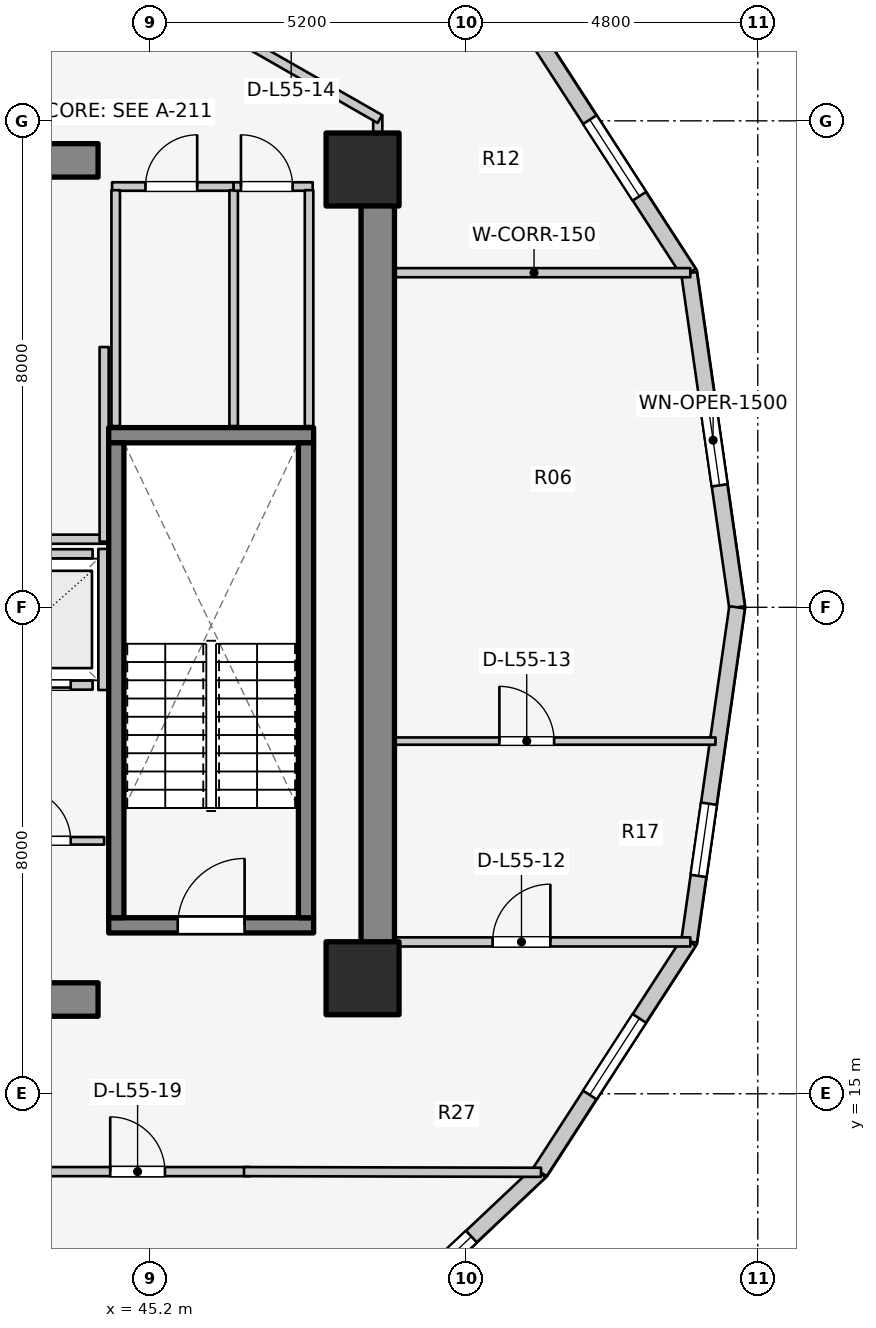
"""IFC4 building model, lengths in metres.
Left out: names, types, materials, properties, quantities, classifications, styles, units other than length and angle.
Written with IfcOpenShell. Run it as: python <this file> out.ifc"""

import sys

from ifc_helpers import new_model, si_unit, direction, frame, frame_2d, origin, origin_2d, place, context, subcontext, project, spatial, rectangle, extrude, element, fill, save


model = new_model("IFC4")
c1 = context("Model", 3, precision=1e-05, world=origin(), true_north=direction((0.0, 1.0)))
c2 = subcontext(c1, "Body", "Model", "MODEL_VIEW")
j1 = project(units=[si_unit("LENGTHUNIT", "METRE"), si_unit("PLANEANGLEUNIT", "RADIAN")], contexts=[c1])
p1 = place(None, origin())
s1 = spatial("IfcSite", under=j1, at=p1, CompositionType="ELEMENT")
p2 = place(p1, origin())
s2 = spatial("IfcBuilding", under=s1, at=p2, CompositionType="ELEMENT")
p3 = place(p2, frame((0.0, 0.0, 180.8)))
s3 = spatial("IfcBuildingStorey", under=s2, at=p3, CompositionType="ELEMENT", Elevation=180.8)
p4 = place(p3, frame((48.95, 17.05, 0.0), z_axis=(0.0, 0.0, 1.0), x_axis=(0.0, 1.0, 0.0)))
e1 = element("IfcWall", 1, at=p4, inside=s3, PredefinedType="SHEAR", context=c2, shape_type="SweptSolid", body=[
    extrude(rectangle(XDim=12.8, YDim=0.55, at=frame_2d((6.4, 0.0))), origin(), (0.0, 0.0, 1.0), 3.1),
])
for number, where, z_axis, x_axis in (
    (2, (39.85, 16.55, 0.0), (0.0, 0.0, 1.0), (1.0, 0.0, 0.0)),
    (3, (39.85, 30.35, 0.0), (0.0, 0.0, 1.0), (1.0, 0.0, 0.0)),
):
    element("IfcWall", number, at=place(p3, frame(where, z_axis=z_axis, x_axis=x_axis)), inside=s3, PredefinedType="SHEAR", context=c2, shape_type="SweptSolid", body=[
        extrude(rectangle(XDim=4.5, YDim=0.55, at=frame_2d((2.25, 0.0))), origin(), (0.0, 0.0, 1.0), 3.1),
    ])
p5 = place(p3, frame((44.525, 17.77, 0.0), z_axis=(0.0, 0.0, 1.0), x_axis=(1.0, 0.0, 0.0)))
e4 = element("IfcWall", 4, at=p5, inside=s3, PredefinedType="SOLIDWALL", context=c2, shape_type="SweptSolid", body=[
    extrude(rectangle(XDim=3.37, YDim=0.25, at=frame_2d((1.685, 0.0))), origin(), (0.0, 0.0, 1.0), 3.1),
])
p6 = place(p5, frame((1.135, 0.0, 0.0)))
e5 = element("IfcOpeningElement", 5, at=p6, cuts=e4, PredefinedType="OPENING", context=c2, shape_type="SweptSolid", body=[
    extrude(rectangle(XDim=1.1, YDim=2.1, at=frame_2d((0.55, 1.05))), frame((0.0, 0.135, 0.0), z_axis=(0.0, -1.0, 0.0), x_axis=(1.0, 0.0, 0.0)), (0.0, 0.0, 1.0), 0.27),
])
p7 = place(p3, frame((44.525, 25.83, 0.0), z_axis=(0.0, 0.0, 1.0), x_axis=(1.0, 0.0, 0.0)))
e6 = element("IfcWall", 6, at=p7, inside=s3, PredefinedType="SOLIDWALL", context=c2, shape_type="SweptSolid", body=[
    extrude(rectangle(XDim=3.37, YDim=0.25, at=frame_2d((1.685, 0.0))), origin(), (0.0, 0.0, 1.0), 3.1),
])
for number, where, z_axis, x_axis in (
    (7, (44.65, 17.895, 0.0), (0.0, 0.0, 1.0), (0.0, 1.0, 0.0)),
    (8, (47.77, 17.895, 0.0), (0.0, 0.0, 1.0), (0.0, 1.0, 0.0)),
):
    element("IfcWall", number, at=place(p3, frame(where, z_axis=z_axis, x_axis=x_axis)), inside=s3, PredefinedType="SOLIDWALL", context=c2, shape_type="SweptSolid", body=[
        extrude(rectangle(XDim=7.81, YDim=0.25, at=frame_2d((3.905, 0.0))), origin(), (0.0, 0.0, 1.0), 3.1),
    ])
for number, where, z_axis, x_axis in (
    (9, (48.7, 16.9, 0.0), (0.0, 0.0, 1.0), (1.0, 0.0, 0.0)),
    (10, (48.7, 30.2, 0.0), (0.0, 0.0, 1.0), (1.0, 0.0, 0.0)),
):
    element("IfcColumn", number, at=place(p3, frame(where, z_axis=z_axis, x_axis=x_axis)), inside=s3, PredefinedType="COLUMN", context=c2, shape_type="SweptSolid", body=[
        extrude(rectangle(XDim=1.2, YDim=1.2, at=origin_2d()), origin(), (0.0, 0.0, 1.0), 3.1),
    ])
p8 = place(p3, frame((54.86, 23.0, 0.0), z_axis=(0.0, 0.0, 1.0), x_axis=(-0.142227632286, 0.989833976288, 0.0)))
e11 = element("IfcWall", 11, at=p8, inside=s3, PredefinedType="STANDARD", context=c2, shape_type="SweptSolid", body=[
    extrude(rectangle(XDim=5.553, YDim=0.26, at=frame_2d((2.776, 0.0))), origin(), (0.0, 0.0, 1.0), 2.85),
])
p9 = place(p8, frame((2.027, 0.0, 0.75)))
e12 = element("IfcOpeningElement", 12, at=p9, cuts=e11, PredefinedType="OPENING", context=c2, shape_type="SweptSolid", body=[
    extrude(rectangle(XDim=1.5, YDim=1.6, at=frame_2d((0.75, 0.8))), frame((0.0, 0.14, 0.0), z_axis=(0.0, -1.0, 0.0), x_axis=(1.0, 0.0, 0.0)), (0.0, 0.0, 1.0), 0.28),
])
p10 = place(p3, frame((54.07, 28.497, 0.0), z_axis=(0.0, 0.0, 1.0), x_axis=(-0.543358984534, 0.839500454989, 0.0)))
e13 = element("IfcWall", 13, at=p10, inside=s3, PredefinedType="STANDARD", context=c2, shape_type="SweptSolid", body=[
    extrude(rectangle(XDim=4.511, YDim=0.26, at=frame_2d((2.256, 0.0))), origin(), (0.0, 0.0, 1.0), 2.85),
])
p11 = place(p10, frame((1.506, 0.0, 0.75)))
e14 = element("IfcOpeningElement", 14, at=p11, cuts=e13, PredefinedType="OPENING", context=c2, shape_type="SweptSolid", body=[
    extrude(rectangle(XDim=1.5, YDim=1.6, at=frame_2d((0.75, 0.8))), frame((0.0, 0.14, 0.0), z_axis=(0.0, -1.0, 0.0), x_axis=(1.0, 0.0, 0.0)), (0.0, 0.0, 1.0), 0.28),
])
p12 = place(p3, frame((48.269, 10.559, 0.0), z_axis=(0.0, 0.0, 1.0), x_axis=(0.727667301037, 0.68593024354, 0.0)))
e15 = element("IfcWall", 15, at=p12, inside=s3, PredefinedType="STANDARD", context=c2, shape_type="SweptSolid", body=[
    extrude(rectangle(XDim=4.604, YDim=0.26, at=frame_2d((2.302, 0.0))), origin(), (0.0, 0.0, 1.0), 2.85),
])
p13 = place(p12, frame((1.552, 0.0, 0.75)))
e16 = element("IfcOpeningElement", 16, at=p13, cuts=e15, PredefinedType="OPENING", context=c2, shape_type="SweptSolid", body=[
    extrude(rectangle(XDim=1.5, YDim=1.6, at=frame_2d((0.75, 0.8))), frame((0.0, 0.14, 0.0), z_axis=(0.0, -1.0, 0.0), x_axis=(1.0, 0.0, 0.0)), (0.0, 0.0, 1.0), 0.28),
])
p14 = place(p3, frame((51.619, 13.716, 0.0), z_axis=(0.0, 0.0, 1.0), x_axis=(0.543358984534, 0.839500454989, 0.0)))
e17 = element("IfcWall", 17, at=p14, inside=s3, PredefinedType="STANDARD", context=c2, shape_type="SweptSolid", body=[
    extrude(rectangle(XDim=4.511, YDim=0.26, at=frame_2d((2.256, 0.0))), origin(), (0.0, 0.0, 1.0), 2.85),
])
p15 = place(p14, frame((1.506, 0.0, 0.75)))
e18 = element("IfcOpeningElement", 18, at=p15, cuts=e17, PredefinedType="OPENING", context=c2, shape_type="SweptSolid", body=[
    extrude(rectangle(XDim=1.5, YDim=1.6, at=frame_2d((0.75, 0.8))), frame((0.0, 0.14, 0.0), z_axis=(0.0, -1.0, 0.0), x_axis=(1.0, 0.0, 0.0)), (0.0, 0.0, 1.0), 0.28),
])
p16 = place(p3, frame((54.07, 17.503, 0.0), z_axis=(0.0, 0.0, 1.0), x_axis=(0.142227632286, 0.989833976288, 0.0)))
e19 = element("IfcWall", 19, at=p16, inside=s3, PredefinedType="STANDARD", context=c2, shape_type="SweptSolid", body=[
    extrude(rectangle(XDim=5.553, YDim=0.26, at=frame_2d((2.776, 0.0))), origin(), (0.0, 0.0, 1.0), 2.85),
])
p17 = place(p16, frame((1.09, 0.0, 0.75)))
e20 = element("IfcOpeningElement", 20, at=p17, cuts=e19, PredefinedType="OPENING", context=c2, shape_type="SweptSolid", body=[
    extrude(rectangle(XDim=1.2, YDim=1.5, at=frame_2d((0.6, 0.75))), frame((0.0, 0.14, 0.0), z_axis=(0.0, -1.0, 0.0), x_axis=(1.0, 0.0, 0.0)), (0.0, 0.0, 1.0), 0.28),
])
p18 = place(p3, frame((42.44, 21.72, 0.0), z_axis=(0.0, 0.0, 1.0), x_axis=(1.0, 0.0, 0.0)))
e21 = element("IfcWall", 21, at=p18, inside=s3, PredefinedType="SOLIDWALL", context=c2, shape_type="SweptSolid", body=[
    extrude(rectangle(XDim=1.82, YDim=0.15, at=frame_2d((0.91, 0.0))), origin(), (0.0, 0.0, 1.0), 2.855),
])
p19 = place(p18, frame((0.36, 0.0, 0.0)))
e22 = element("IfcOpeningElement", 22, at=p19, cuts=e21, PredefinedType="OPENING", context=c2, shape_type="SweptSolid", body=[
    extrude(rectangle(XDim=1.1, YDim=2.1, at=frame_2d((0.55, 1.05))), frame((0.0, 0.085, 0.0), z_axis=(0.0, -1.0, 0.0), x_axis=(1.0, 0.0, 0.0)), (0.0, 0.0, 1.0), 0.17),
])
p20 = place(p3, frame((42.44, 23.88, 0.0), z_axis=(0.0, 0.0, 1.0), x_axis=(1.0, 0.0, 0.0)))
e23 = element("IfcWall", 23, at=p20, inside=s3, PredefinedType="SOLIDWALL", context=c2, shape_type="SweptSolid", body=[
    extrude(rectangle(XDim=1.82, YDim=0.15, at=frame_2d((0.91, 0.0))), origin(), (0.0, 0.0, 1.0), 2.855),
])
p21 = place(p3, frame((44.43, 21.64, 0.0), z_axis=(0.0, 0.0, 1.0), x_axis=(0.0, 1.0, 0.0)))
e24 = element("IfcWall", 24, at=p21, inside=s3, PredefinedType="SOLIDWALL", context=c2, shape_type="SweptSolid", body=[
    extrude(rectangle(XDim=2.32, YDim=0.15, at=frame_2d((1.16, 0.0))), origin(), (0.0, 0.0, 1.0), 2.855),
])
p22 = place(p3, frame((39.4, 24.12, 0.0), z_axis=(0.0, 0.0, 1.0), x_axis=(1.0, 0.0, 0.0)))
e25 = element("IfcWall", 25, at=p22, inside=s3, PredefinedType="PARTITIONING", context=c2, shape_type="SweptSolid", body=[
    extrude(rectangle(XDim=5.08, YDim=0.15, at=frame_2d((2.54, 0.0))), origin(), (0.0, 0.0, 1.0), 2.12),
])
p23 = place(p3, frame((44.45, 24.08, 0.0), z_axis=(0.0, 0.0, 1.0), x_axis=(0.0, 1.0, 0.0)))
e26 = element("IfcWall", 26, at=p23, inside=s3, PredefinedType="PARTITIONING", context=c2, shape_type="SweptSolid", body=[
    extrude(rectangle(XDim=3.2, YDim=0.15, at=frame_2d((1.6, 0.0))), origin(), (0.0, 0.0, 1.0), 2.855),
])
p24 = place(p3, frame((41.0, 19.16, 0.0), z_axis=(0.0, 0.0, 1.0), x_axis=(1.0, 0.0, 0.0)))
e27 = element("IfcWall", 27, at=p24, inside=s3, PredefinedType="PARTITIONING", context=c2, shape_type="SweptSolid", body=[
    extrude(rectangle(XDim=3.45, YDim=0.125, at=frame_2d((1.725, 0.0))), origin(), (0.0, 0.0, 1.0), 2.12),
])
p25 = place(p24, frame((2.05, 0.0, 0.0)))
e28 = element("IfcOpeningElement", 28, at=p25, cuts=e27, PredefinedType="OPENING", context=c2, shape_type="SweptSolid", body=[
    extrude(rectangle(XDim=0.85, YDim=2.05, at=frame_2d((0.425, 1.025))), frame((0.0, 0.073, 0.0), z_axis=(0.0, -1.0, 0.0), x_axis=(1.0, 0.0, 0.0)), (0.0, 0.0, 1.0), 0.145),
])
p26 = place(p3, frame((44.58, 29.92, 0.0), z_axis=(0.0, 0.0, 1.0), x_axis=(1.0, 0.0, 0.0)))
e29 = element("IfcWall", 29, at=p26, inside=s3, PredefinedType="PLUMBINGWALL", context=c2, shape_type="SweptSolid", body=[
    extrude(rectangle(XDim=2.0, YDim=0.14, at=frame_2d((1.0, 0.0))), origin(), (0.0, 0.0, 1.0), 2.855),
])
p27 = place(p26, frame((0.55, 0.0, 0.0)))
e30 = element("IfcOpeningElement", 30, at=p27, cuts=e29, PredefinedType="OPENING", context=c2, shape_type="SweptSolid", body=[
    extrude(rectangle(XDim=0.85, YDim=2.05, at=frame_2d((0.425, 1.025))), frame((0.0, 0.08, 0.0), z_axis=(0.0, -1.0, 0.0), x_axis=(1.0, 0.0, 0.0)), (0.0, 0.0, 1.0), 0.16),
])
for number, where, z_axis, x_axis in (
    (31, (44.64, 25.98, 0.0), (0.0, 0.0, 1.0), (0.0, 1.0, 0.0)),
    (32, (46.58, 25.98, 0.0), (0.0, 0.0, 1.0), (0.0, 1.0, 0.0)),
):
    element("IfcWall", number, at=place(p3, frame(where, z_axis=z_axis, x_axis=x_axis)), inside=s3, PredefinedType="PLUMBINGWALL", context=c2, shape_type="SweptSolid", body=[
        extrude(rectangle(XDim=3.88, YDim=0.14, at=frame_2d((1.94, 0.0))), origin(), (0.0, 0.0, 1.0), 2.855),
    ])
p28 = place(p3, frame((46.58, 29.92, 0.0), z_axis=(0.0, 0.0, 1.0), x_axis=(1.0, 0.0, 0.0)))
e33 = element("IfcWall", 33, at=p28, inside=s3, PredefinedType="PLUMBINGWALL", context=c2, shape_type="SweptSolid", body=[
    extrude(rectangle(XDim=1.3, YDim=0.14, at=frame_2d((0.65, 0.0))), origin(), (0.0, 0.0, 1.0), 2.855),
])
p29 = place(p28, frame((0.12, 0.0, 0.0)))
e34 = element("IfcOpeningElement", 34, at=p29, cuts=e33, PredefinedType="OPENING", context=c2, shape_type="SweptSolid", body=[
    extrude(rectangle(XDim=0.85, YDim=2.05, at=frame_2d((0.425, 1.025))), frame((0.0, 0.08, 0.0), z_axis=(0.0, -1.0, 0.0), x_axis=(1.0, 0.0, 0.0)), (0.0, 0.0, 1.0), 0.16),
])
p30 = place(p3, frame((47.82, 25.98, 0.0), z_axis=(0.0, 0.0, 1.0), x_axis=(0.0, 1.0, 0.0)))
e35 = element("IfcWall", 35, at=p30, inside=s3, PredefinedType="PLUMBINGWALL", context=c2, shape_type="SweptSolid", body=[
    extrude(rectangle(XDim=3.88, YDim=0.14, at=frame_2d((1.94, 0.0))), origin(), (0.0, 0.0, 1.0), 2.855),
])
p31 = place(p3, frame((48.95, 17.497, 0.0), z_axis=(0.0, 0.0, 1.0), x_axis=(1.0, 0.0, 0.0)))
e36 = element("IfcWall", 36, at=p31, inside=s3, PredefinedType="PARTITIONING", context=c2, shape_type="SweptSolid", body=[
    extrude(rectangle(XDim=5.14, YDim=0.15, at=frame_2d((2.57, 0.0))), origin(), (0.0, 0.0, 1.0), 2.855),
])
p32 = place(p31, frame((1.889, 0.0, 0.0)))
e37 = element("IfcOpeningElement", 37, at=p32, cuts=e36, PredefinedType="OPENING", context=c2, shape_type="SweptSolid", body=[
    extrude(rectangle(XDim=0.95, YDim=2.1, at=frame_2d((0.475, 1.05))), frame((0.0, 0.085, 0.0), z_axis=(0.0, -1.0, 0.0), x_axis=(1.0, 0.0, 0.0)), (0.0, 0.0, 1.0), 0.17),
])
p33 = place(p3, frame((48.95, 28.503, 0.0), z_axis=(0.0, 0.0, 1.0), x_axis=(1.0, 0.0, 0.0)))
e38 = element("IfcWall", 38, at=p33, inside=s3, PredefinedType="PARTITIONING", context=c2, shape_type="SweptSolid", body=[
    extrude(rectangle(XDim=5.14, YDim=0.15, at=frame_2d((2.57, 0.0))), origin(), (0.0, 0.0, 1.0), 2.855),
])
p34 = place(p3, frame((48.95, 20.8, 0.0), z_axis=(0.0, 0.0, 1.0), x_axis=(1.0, 0.0, 0.0)))
e39 = element("IfcWall", 39, at=p34, inside=s3, PredefinedType="MOVABLE", context=c2, shape_type="SweptSolid", body=[
    extrude(rectangle(XDim=5.554, YDim=0.12, at=frame_2d((2.777, 0.0))), origin(), (0.0, 0.0, 1.0), 2.855),
])
p35 = place(p34, frame((2.0, 0.0, 0.0)))
e40 = element("IfcOpeningElement", 40, at=p35, cuts=e39, PredefinedType="OPENING", context=c2, shape_type="SweptSolid", body=[
    extrude(rectangle(XDim=0.9, YDim=2.1, at=frame_2d((0.45, 1.05))), frame((0.0, 0.07, 0.0), z_axis=(0.0, -1.0, 0.0), x_axis=(1.0, 0.0, 0.0)), (0.0, 0.0, 1.0), 0.14),
])
p36 = place(p3, frame((48.95, 29.8, 0.0), z_axis=(0.0, 0.0, 1.0), x_axis=(0.0, 1.0, 0.0)))
e41 = element("IfcWall", 41, at=p36, inside=s3, PredefinedType="PARTITIONING", context=c2, shape_type="SweptSolid", body=[
    extrude(rectangle(XDim=1.29, YDim=0.15, at=frame_2d((0.645, 0.0))), origin(), (0.0, 0.0, 1.0), 2.855),
])
p37 = place(p3, frame((46.757, 32.305, 0.0), z_axis=(0.0, 0.0, 1.0), x_axis=(0.867991349648, -0.496579315857, 0.0)))
e42 = element("IfcWall", 42, at=p37, inside=s3, PredefinedType="PARTITIONING", context=c2, shape_type="SweptSolid", body=[
    extrude(rectangle(XDim=2.567, YDim=0.15, at=frame_2d((1.283, 0.0))), origin(), (0.0, 0.0, 1.0), 2.22),
])
p38 = place(p3, frame((39.33, 13.72, 0.0), z_axis=(0.0, 0.0, 1.0), x_axis=(1.0, 0.0, 0.0)))
e43 = element("IfcWall", 43, at=p38, inside=s3, PredefinedType="PARTITIONING", context=c2, shape_type="SweptSolid", body=[
    extrude(rectangle(XDim=7.52, YDim=0.15, at=frame_2d((3.76, 0.0))), origin(), (0.0, 0.0, 1.0), 2.299),
])
p39 = place(p38, frame((5.22, 0.0, 0.0)))
e44 = element("IfcOpeningElement", 44, at=p39, cuts=e43, PredefinedType="OPENING", context=c2, shape_type="SweptSolid", body=[
    extrude(rectangle(XDim=0.9, YDim=2.1, at=frame_2d((0.45, 1.05))), frame((0.0, 0.085, 0.0), z_axis=(0.0, -1.0, 0.0), x_axis=(1.0, 0.0, 0.0)), (0.0, 0.0, 1.0), 0.17),
])
p40 = place(p3, frame((46.75, 13.72, 0.0), z_axis=(0.0, 0.0, 1.0), x_axis=(0.999997122315, -0.00239903348, 0.0)))
e45 = element("IfcWall", 45, at=p40, inside=s3, PredefinedType="PARTITIONING", context=c2, shape_type="SweptSolid", body=[
    extrude(rectangle(XDim=4.885, YDim=0.15, at=frame_2d((2.442, 0.0))), origin(), (0.0, 0.0, 1.0), 2.22),
])
p41 = place(p9, origin())
e46 = element("IfcWindow", 46, at=p41, inside=s3, PartitioningType="SINGLE_PANEL", PredefinedType="WINDOW", context=c2, shape_type="SweptSolid", body=[
    extrude(rectangle(XDim=1.5, YDim=1.6, at=frame_2d((0.75, 0.8))), frame((0.0, 0.03, 0.0), z_axis=(0.0, -1.0, 0.0), x_axis=(1.0, 0.0, 0.0)), (0.0, 0.0, 1.0), 0.06),
])
fill(e12, e46)
p42 = place(p11, origin())
e47 = element("IfcWindow", 47, at=p42, inside=s3, PartitioningType="SINGLE_PANEL", PredefinedType="WINDOW", context=c2, shape_type="SweptSolid", body=[
    extrude(rectangle(XDim=1.5, YDim=1.6, at=frame_2d((0.75, 0.8))), frame((0.0, 0.03, 0.0), z_axis=(0.0, -1.0, 0.0), x_axis=(1.0, 0.0, 0.0)), (0.0, 0.0, 1.0), 0.06),
])
fill(e14, e47)
p43 = place(p13, origin())
e48 = element("IfcWindow", 48, at=p43, inside=s3, PartitioningType="SINGLE_PANEL", PredefinedType="WINDOW", context=c2, shape_type="SweptSolid", body=[
    extrude(rectangle(XDim=1.5, YDim=1.6, at=frame_2d((0.75, 0.8))), frame((0.0, 0.03, 0.0), z_axis=(0.0, -1.0, 0.0), x_axis=(1.0, 0.0, 0.0)), (0.0, 0.0, 1.0), 0.06),
])
fill(e16, e48)
p44 = place(p15, origin())
e49 = element("IfcWindow", 49, at=p44, inside=s3, PartitioningType="SINGLE_PANEL", PredefinedType="WINDOW", context=c2, shape_type="SweptSolid", body=[
    extrude(rectangle(XDim=1.5, YDim=1.6, at=frame_2d((0.75, 0.8))), frame((0.0, 0.03, 0.0), z_axis=(0.0, -1.0, 0.0), x_axis=(1.0, 0.0, 0.0)), (0.0, 0.0, 1.0), 0.06),
])
fill(e18, e49)
p45 = place(p17, origin())
e50 = element("IfcWindow", 50, at=p45, inside=s3, PartitioningType="SINGLE_PANEL", PredefinedType="WINDOW", context=c2, shape_type="SweptSolid", body=[
    extrude(rectangle(XDim=1.2, YDim=1.5, at=frame_2d((0.6, 0.75))), frame((0.0, 0.03, 0.0), z_axis=(0.0, -1.0, 0.0), x_axis=(1.0, 0.0, 0.0)), (0.0, 0.0, 1.0), 0.06),
])
fill(e20, e50)
p46 = place(p6, origin())
e51 = element("IfcDoor", 51, at=p46, inside=s3, OperationType="SINGLE_SWING_RIGHT", PredefinedType="DOOR", context=c2, shape_type="SweptSolid", body=[
    extrude(rectangle(XDim=1.1, YDim=2.1, at=frame_2d((0.55, 1.05))), frame((0.0, 0.025, 0.0), z_axis=(0.0, -1.0, 0.0), x_axis=(1.0, 0.0, 0.0)), (0.0, 0.0, 1.0), 0.05),
])
fill(e5, e51)
p47 = place(p19, origin())
e52 = element("IfcDoor", 52, at=p47, inside=s3, OperationType="DOUBLE_DOOR_SLIDING", PredefinedType="DOOR", context=c2, shape_type="SweptSolid", body=[
    extrude(rectangle(XDim=1.1, YDim=2.1, at=frame_2d((0.55, 1.05))), frame((0.0, 0.025, 0.0), z_axis=(0.0, -1.0, 0.0), x_axis=(1.0, 0.0, 0.0)), (0.0, 0.0, 1.0), 0.05),
])
fill(e22, e52)
p48 = place(p25, origin())
e53 = element("IfcDoor", 53, at=p48, inside=s3, OperationType="SINGLE_SWING_LEFT", PredefinedType="DOOR", context=c2, shape_type="SweptSolid", body=[
    extrude(rectangle(XDim=0.85, YDim=2.05, at=frame_2d((0.425, 1.025))), frame((0.0, 0.025, 0.0), z_axis=(0.0, -1.0, 0.0), x_axis=(1.0, 0.0, 0.0)), (0.0, 0.0, 1.0), 0.05),
])
fill(e28, e53)
p49 = place(p27, origin())
e54 = element("IfcDoor", 54, at=p49, inside=s3, OperationType="SINGLE_SWING_RIGHT", PredefinedType="DOOR", context=c2, shape_type="SweptSolid", body=[
    extrude(rectangle(XDim=0.85, YDim=2.05, at=frame_2d((0.425, 1.025))), frame((0.0, 0.025, 0.0), z_axis=(0.0, -1.0, 0.0), x_axis=(1.0, 0.0, 0.0)), (0.0, 0.0, 1.0), 0.05),
])
fill(e30, e54)
p50 = place(p29, origin())
e55 = element("IfcDoor", 55, at=p50, inside=s3, OperationType="SINGLE_SWING_LEFT", PredefinedType="DOOR", context=c2, shape_type="SweptSolid", body=[
    extrude(rectangle(XDim=0.85, YDim=2.05, at=frame_2d((0.425, 1.025))), frame((0.0, 0.025, 0.0), z_axis=(0.0, -1.0, 0.0), x_axis=(1.0, 0.0, 0.0)), (0.0, 0.0, 1.0), 0.05),
])
fill(e34, e55)
p51 = place(p32, origin())
e56 = element("IfcDoor", 56, at=p51, inside=s3, OperationType="SINGLE_SWING_RIGHT", PredefinedType="DOOR", context=c2, shape_type="SweptSolid", body=[
    extrude(rectangle(XDim=0.95, YDim=2.1, at=frame_2d((0.475, 1.05))), frame((0.0, 0.025, 0.0), z_axis=(0.0, -1.0, 0.0), x_axis=(1.0, 0.0, 0.0)), (0.0, 0.0, 1.0), 0.05),
])
fill(e37, e56)
p52 = place(p35, origin())
e57 = element("IfcDoor", 57, at=p52, inside=s3, OperationType="SINGLE_SWING_LEFT", PredefinedType="DOOR", context=c2, shape_type="SweptSolid", body=[
    extrude(rectangle(XDim=0.9, YDim=2.1, at=frame_2d((0.45, 1.05))), frame((0.0, 0.025, 0.0), z_axis=(0.0, -1.0, 0.0), x_axis=(1.0, 0.0, 0.0)), (0.0, 0.0, 1.0), 0.05),
])
fill(e40, e57)
p53 = place(p39, origin())
e58 = element("IfcDoor", 58, at=p53, inside=s3, OperationType="SINGLE_SWING_LEFT", PredefinedType="DOOR", context=c2, shape_type="SweptSolid", body=[
    extrude(rectangle(XDim=0.9, YDim=2.1, at=frame_2d((0.45, 1.05))), frame((0.0, 0.025, 0.0), z_axis=(0.0, -1.0, 0.0), x_axis=(1.0, 0.0, 0.0)), (0.0, 0.0, 1.0), 0.05),
])
fill(e44, e58)
save(model, sys.argv[1])
